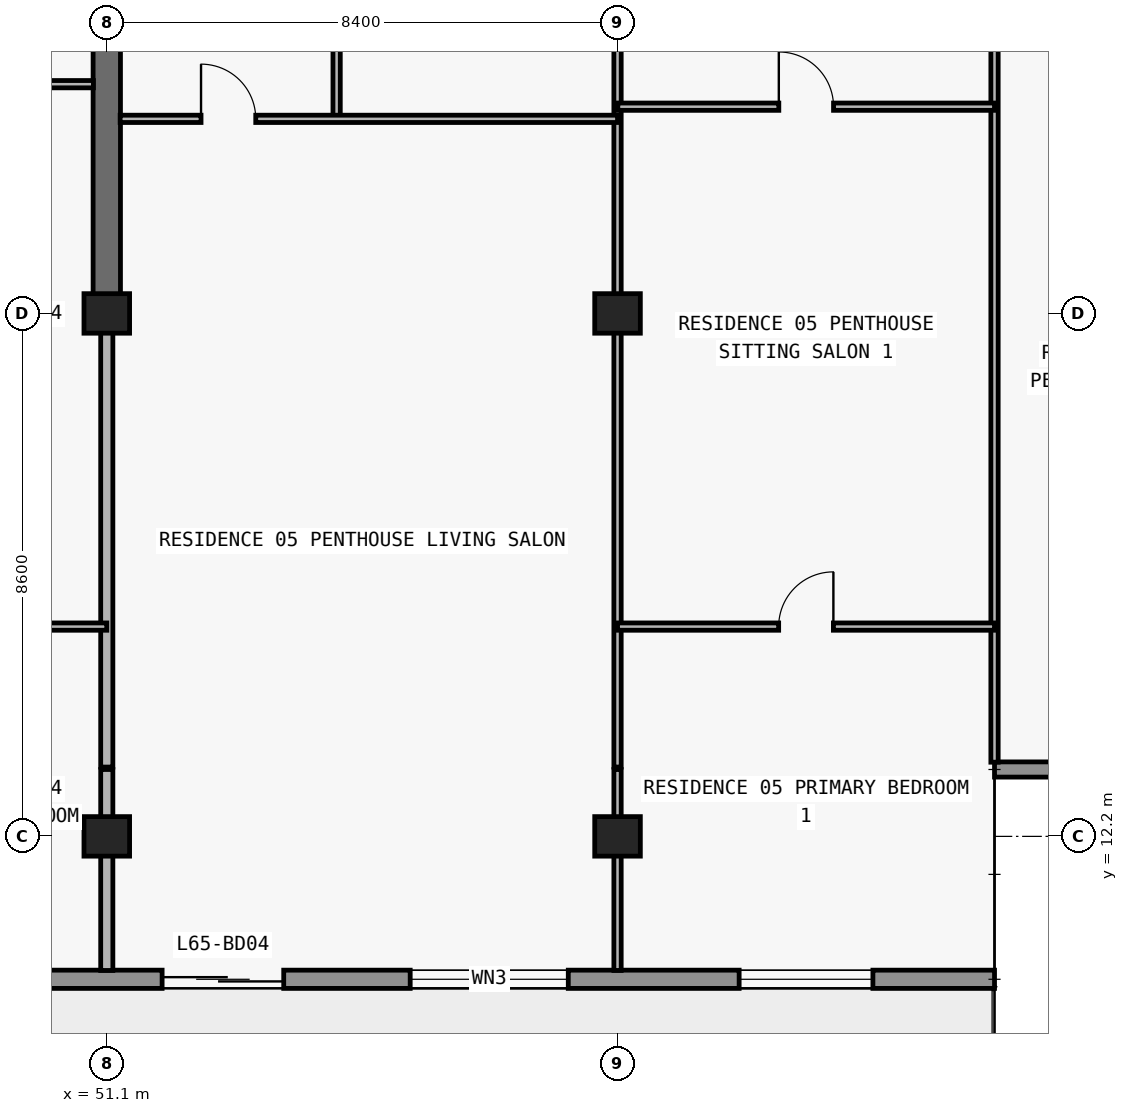
"""IFC4 building model, lengths in metres.
Left out: names, types, materials, properties, quantities, classifications, styles, units other than length and angle.
Written with IfcOpenShell. Run it as: python <this file> out.ifc"""

import sys

from ifc_helpers import new_model, si_unit, direction, frame, frame_2d, origin, origin_2d, place, context, subcontext, project, spatial, rectangle, extrude, element, fill, save


model = new_model("IFC4")
c1 = context("Model", 3, precision=1e-05, world=origin(), true_north=direction((0.0, 1.0)))
c2 = subcontext(c1, "Body", "Model", "MODEL_VIEW")
j1 = project(units=[si_unit("LENGTHUNIT", "METRE"), si_unit("PLANEANGLEUNIT", "RADIAN")], contexts=[c1])
p1 = place(None, origin())
s1 = spatial("IfcSite", under=j1, at=p1, CompositionType="ELEMENT")
p2 = place(p1, origin())
s2 = spatial("IfcBuilding", under=s1, at=p2, CompositionType="ELEMENT")
p3 = place(p2, frame((0.0, 0.0, 233.1)))
s3 = spatial("IfcBuildingStorey", under=s2, at=p3, CompositionType="ELEMENT", Elevation=233.1)
for number, where, z_axis, x_axis in (
    (1, (51.1, 12.2, 0.0), (0.0, 0.0, 1.0), (1.0, 0.0, 0.0)),
    (2, (59.5, 12.2, 0.0), (0.0, 0.0, 1.0), (1.0, 0.0, 0.0)),
    (3, (51.1, 20.8, 0.0), (0.0, 0.0, 1.0), (1.0, 0.0, 0.0)),
    (4, (59.5, 20.8, 0.0), (0.0, 0.0, 1.0), (1.0, 0.0, 0.0)),
):
    element("IfcColumn", number, at=place(p3, frame(where, z_axis=z_axis, x_axis=x_axis)), inside=s3, PredefinedType="COLUMN", context=c2, shape_type="SweptSolid", body=[
        extrude(rectangle(XDim=0.75, YDim=0.65, at=origin_2d()), origin(), (0.0, 0.0, 1.0), 3.05),
    ])
p4 = place(p3, frame((51.1, 20.8, 0.0), z_axis=(0.0, 0.0, 1.0), x_axis=(0.0, 1.0, 0.0)))
e5 = element("IfcWall", 5, at=p4, inside=s3, PredefinedType="SHEAR", context=c2, shape_type="SweptSolid", body=[
    extrude(rectangle(XDim=8.6, YDim=0.45, at=frame_2d((4.3, 0.0))), origin(), (0.0, 0.0, 1.0), 3.05),
])
p5 = place(p3, frame((65.7, 9.85, 0.0), z_axis=(0.0, 0.0, 1.0), x_axis=(-1.0, 0.0, 0.0)))
e6 = element("IfcWall", 6, at=p5, inside=s3, PredefinedType="STANDARD", context=c2, shape_type="SweptSolid", body=[
    extrude(rectangle(XDim=53.6, YDim=0.3, at=frame_2d((26.8, 0.0))), origin(), (0.0, 0.0, 1.0), 3.05),
])
p6 = place(p5, frame((49.5, 0.0, 0.0)))
e7 = element("IfcOpeningElement", 7, at=p6, cuts=e6, PredefinedType="OPENING", context=c2, shape_type="SweptSolid", body=[
    extrude(rectangle(XDim=2.0, YDim=2.3, at=frame_2d((1.0, 1.15))), frame((0.0, 0.16, 0.0), z_axis=(0.0, -1.0, 0.0), x_axis=(1.0, 0.0, 0.0)), (0.0, 0.0, 1.0), 0.32),
])
p7 = place(p5, frame((42.1, 0.0, 0.85)))
e8 = element("IfcOpeningElement", 8, at=p7, cuts=e6, PredefinedType="OPENING", context=c2, shape_type="SweptSolid", body=[
    extrude(rectangle(XDim=2.2, YDim=1.55, at=frame_2d((1.1, 0.775))), frame((0.0, 0.16, 0.0), z_axis=(0.0, -1.0, 0.0), x_axis=(1.0, 0.0, 0.0)), (0.0, 0.0, 1.0), 0.32),
])
p8 = place(p5, frame((35.69, 0.0, 0.0)))
e9 = element("IfcOpeningElement", 9, at=p8, cuts=e6, PredefinedType="OPENING", context=c2, shape_type="SweptSolid", body=[
    extrude(rectangle(XDim=2.0, YDim=2.3, at=frame_2d((1.0, 1.15))), frame((0.0, 0.16, 0.0), z_axis=(0.0, -1.0, 0.0), x_axis=(1.0, 0.0, 0.0)), (0.0, 0.0, 1.0), 0.32),
])
p9 = place(p5, frame((31.59, 0.0, 0.85)))
e10 = element("IfcOpeningElement", 10, at=p9, cuts=e6, PredefinedType="OPENING", context=c2, shape_type="SweptSolid", body=[
    extrude(rectangle(XDim=1.8, YDim=1.55, at=frame_2d((0.9, 0.775))), frame((0.0, 0.16, 0.0), z_axis=(0.0, -1.0, 0.0), x_axis=(1.0, 0.0, 0.0)), (0.0, 0.0, 1.0), 0.32),
])
p10 = place(p5, frame((23.914, 0.0, 0.85)))
e11 = element("IfcOpeningElement", 11, at=p10, cuts=e6, PredefinedType="OPENING", context=c2, shape_type="SweptSolid", body=[
    extrude(rectangle(XDim=2.2, YDim=1.55, at=frame_2d((1.1, 0.775))), frame((0.0, 0.16, 0.0), z_axis=(0.0, -1.0, 0.0), x_axis=(1.0, 0.0, 0.0)), (0.0, 0.0, 1.0), 0.32),
])
p11 = place(p5, frame((19.69, 0.0, 0.0)))
e12 = element("IfcOpeningElement", 12, at=p11, cuts=e6, PredefinedType="OPENING", context=c2, shape_type="SweptSolid", body=[
    extrude(rectangle(XDim=2.0, YDim=2.3, at=frame_2d((1.0, 1.15))), frame((0.0, 0.16, 0.0), z_axis=(0.0, -1.0, 0.0), x_axis=(1.0, 0.0, 0.0)), (0.0, 0.0, 1.0), 0.32),
])
p12 = place(p5, frame((15.59, 0.0, 0.85)))
e13 = element("IfcOpeningElement", 13, at=p12, cuts=e6, PredefinedType="OPENING", context=c2, shape_type="SweptSolid", body=[
    extrude(rectangle(XDim=1.8, YDim=1.55, at=frame_2d((0.9, 0.775))), frame((0.0, 0.16, 0.0), z_axis=(0.0, -1.0, 0.0), x_axis=(1.0, 0.0, 0.0)), (0.0, 0.0, 1.0), 0.32),
])
p13 = place(p5, frame((11.69, 0.0, 0.0)))
e14 = element("IfcOpeningElement", 14, at=p13, cuts=e6, PredefinedType="OPENING", context=c2, shape_type="SweptSolid", body=[
    extrude(rectangle(XDim=2.0, YDim=2.3, at=frame_2d((1.0, 1.15))), frame((0.0, 0.16, 0.0), z_axis=(0.0, -1.0, 0.0), x_axis=(1.0, 0.0, 0.0)), (0.0, 0.0, 1.0), 0.32),
])
p14 = place(p5, frame((7.01, 0.0, 0.65)))
e15 = element("IfcOpeningElement", 15, at=p14, cuts=e6, PredefinedType="OPENING", context=c2, shape_type="SweptSolid", body=[
    extrude(rectangle(XDim=2.6, YDim=1.85, at=frame_2d((1.3, 0.925))), frame((0.0, 0.16, 0.0), z_axis=(0.0, -1.0, 0.0), x_axis=(1.0, 0.0, 0.0)), (0.0, 0.0, 1.0), 0.32),
])
p15 = place(p5, frame((2.0, 0.0, 0.85)))
e16 = element("IfcOpeningElement", 16, at=p15, cuts=e6, PredefinedType="OPENING", context=c2, shape_type="SweptSolid", body=[
    extrude(rectangle(XDim=2.2, YDim=1.55, at=frame_2d((1.1, 0.775))), frame((0.0, 0.16, 0.0), z_axis=(0.0, -1.0, 0.0), x_axis=(1.0, 0.0, 0.0)), (0.0, 0.0, 1.0), 0.32),
])
p16 = place(p3, frame((65.7, 13.3, 0.0), z_axis=(0.0, 0.0, 1.0), x_axis=(1.0, 0.0, 0.0)))
e17 = element("IfcWall", 17, at=p16, inside=s3, PredefinedType="ELEMENTEDWALL", context=c2, shape_type="SweptSolid", body=[
    extrude(rectangle(XDim=3.85, YDim=0.25, at=frame_2d((1.925, 0.0))), origin(), (0.0, 0.0, 1.0), 3.05),
])
p17 = place(p3, frame((51.1, 9.995, 0.0), z_axis=(0.0, 0.0, 1.0), x_axis=(0.0, 1.0, 0.0)))
e18 = element("IfcWall", 18, at=p17, inside=s3, PredefinedType="PARTITIONING", context=c2, shape_type="SweptSolid", body=[
    extrude(rectangle(XDim=3.305, YDim=0.2, at=frame_2d((1.652, 0.0))), origin(), (0.0, 0.0, 1.0), 2.263),
])
p18 = place(p3, frame((51.1, 13.34, 0.0), z_axis=(0.0, 0.0, 1.0), x_axis=(0.0, 1.0, 0.0)))
e19 = element("IfcWall", 19, at=p18, inside=s3, PredefinedType="PARTITIONING", context=c2, shape_type="SweptSolid", body=[
    extrude(rectangle(XDim=7.455, YDim=0.2, at=frame_2d((3.728, 0.0))), origin(), (0.0, 0.0, 1.0), 2.263),
])
p19 = place(p3, frame((54.88, 24.0, 0.0), z_axis=(0.0, 0.0, 1.0), x_axis=(0.0, 1.0, 0.0)))
e20 = element("IfcWall", 20, at=p19, inside=s3, PredefinedType="PARTITIONING", context=c2, shape_type="SweptSolid", body=[
    extrude(rectangle(XDim=4.8, YDim=0.12, at=frame_2d((2.4, 0.0))), origin(), (0.0, 0.0, 1.0), 3.05),
])
p20 = place(p19, frame((1.95, 0.0, 0.0)))
e21 = element("IfcOpeningElement", 21, at=p20, cuts=e20, PredefinedType="OPENING", context=c2, shape_type="SweptSolid", body=[
    extrude(rectangle(XDim=0.9, YDim=2.15, at=frame_2d((0.45, 1.075))), frame((0.0, 0.07, 0.0), z_axis=(0.0, -1.0, 0.0), x_axis=(1.0, 0.0, 0.0)), (0.0, 0.0, 1.0), 0.14),
])
p21 = place(p3, frame((59.5, 9.995, 0.0), z_axis=(0.0, 0.0, 1.0), x_axis=(0.0, 1.0, 0.0)))
e22 = element("IfcWall", 22, at=p21, inside=s3, PredefinedType="PARTITIONING", context=c2, shape_type="SweptSolid", body=[
    extrude(rectangle(XDim=3.305, YDim=0.12, at=frame_2d((1.652, 0.0))), origin(), (0.0, 0.0, 1.0), 2.263),
])
p22 = place(p3, frame((59.5, 13.34, 0.0), z_axis=(0.0, 0.0, 1.0), x_axis=(0.0, 1.0, 0.0)))
e23 = element("IfcWall", 23, at=p22, inside=s3, PredefinedType="PARTITIONING", context=c2, shape_type="SweptSolid", body=[
    extrude(rectangle(XDim=16.06, YDim=0.12, at=frame_2d((8.03, 0.0))), origin(), (0.0, 0.0, 1.0), 2.263),
])
p23 = place(p22, frame((12.61, 0.0, 0.0)))
e24 = element("IfcOpeningElement", 24, at=p23, cuts=e23, PredefinedType="OPENING", context=c2, shape_type="SweptSolid", body=[
    extrude(rectangle(XDim=0.9, YDim=2.15, at=frame_2d((0.45, 1.075))), frame((0.0, 0.07, 0.0), z_axis=(0.0, -1.0, 0.0), x_axis=(1.0, 0.0, 0.0)), (0.0, 0.0, 1.0), 0.14),
])
p24 = place(p3, frame((65.7, 13.42, 0.0), z_axis=(0.0, 0.0, 1.0), x_axis=(0.0, 1.0, 0.0)))
e25 = element("IfcWall", 25, at=p24, inside=s3, PredefinedType="PARTITIONING", context=c2, shape_type="SweptSolid", body=[
    extrude(rectangle(XDim=15.98, YDim=0.12, at=frame_2d((7.99, 0.0))), origin(), (0.0, 0.0, 1.0), 2.629),
])
p25 = place(p24, frame((12.53, 0.0, 0.0)))
e26 = element("IfcOpeningElement", 26, at=p25, cuts=e25, PredefinedType="OPENING", context=c2, shape_type="SweptSolid", body=[
    extrude(rectangle(XDim=0.9, YDim=2.15, at=frame_2d((0.45, 1.075))), frame((0.0, 0.07, 0.0), z_axis=(0.0, -1.0, 0.0), x_axis=(1.0, 0.0, 0.0)), (0.0, 0.0, 1.0), 0.14),
])
p26 = place(p3, frame((47.32, 15.65, 0.0), z_axis=(0.0, 0.0, 1.0), x_axis=(1.0, 0.0, 0.0)))
e27 = element("IfcWall", 27, at=p26, inside=s3, PredefinedType="PARTITIONING", context=c2, shape_type="SweptSolid", body=[
    extrude(rectangle(XDim=3.78, YDim=0.12, at=frame_2d((1.89, 0.0))), origin(), (0.0, 0.0, 1.0), 3.05),
])
p27 = place(p26, frame((1.44, 0.0, 0.0)))
e28 = element("IfcOpeningElement", 28, at=p27, cuts=e27, PredefinedType="OPENING", context=c2, shape_type="SweptSolid", body=[
    extrude(rectangle(XDim=0.9, YDim=2.15, at=frame_2d((0.45, 1.075))), frame((0.0, 0.07, 0.0), z_axis=(0.0, -1.0, 0.0), x_axis=(1.0, 0.0, 0.0)), (0.0, 0.0, 1.0), 0.14),
])
p28 = place(p3, frame((59.5, 15.65, 0.0), z_axis=(0.0, 0.0, 1.0), x_axis=(1.0, 0.0, 0.0)))
e29 = element("IfcWall", 29, at=p28, inside=s3, PredefinedType="PARTITIONING", context=c2, shape_type="SweptSolid", body=[
    extrude(rectangle(XDim=6.2, YDim=0.12, at=frame_2d((3.1, 0.0))), origin(), (0.0, 0.0, 1.0), 3.05),
])
p29 = place(p28, frame((2.65, 0.0, 0.0)))
e30 = element("IfcOpeningElement", 30, at=p29, cuts=e29, PredefinedType="OPENING", context=c2, shape_type="SweptSolid", body=[
    extrude(rectangle(XDim=0.9, YDim=2.15, at=frame_2d((0.45, 1.075))), frame((0.0, 0.07, 0.0), z_axis=(0.0, -1.0, 0.0), x_axis=(1.0, 0.0, 0.0)), (0.0, 0.0, 1.0), 0.14),
])
p30 = place(p3, frame((51.32, 24.0, 0.0), z_axis=(0.0, 0.0, 1.0), x_axis=(1.0, 0.0, 0.0)))
e31 = element("IfcWall", 31, at=p30, inside=s3, PredefinedType="PARTITIONING", context=c2, shape_type="SweptSolid", body=[
    extrude(rectangle(XDim=8.18, YDim=0.12, at=frame_2d((4.09, 0.0))), origin(), (0.0, 0.0, 1.0), 3.05),
])
p31 = place(p30, frame((1.33, 0.0, 0.0)))
e32 = element("IfcOpeningElement", 32, at=p31, cuts=e31, PredefinedType="OPENING", context=c2, shape_type="SweptSolid", body=[
    extrude(rectangle(XDim=0.9, YDim=2.15, at=frame_2d((0.45, 1.075))), frame((0.0, 0.07, 0.0), z_axis=(0.0, -1.0, 0.0), x_axis=(1.0, 0.0, 0.0)), (0.0, 0.0, 1.0), 0.14),
])
p32 = place(p3, frame((59.505, 24.2, 0.0), z_axis=(0.0, 0.0, 1.0), x_axis=(1.0, 0.0, 0.0)))
e33 = element("IfcWall", 33, at=p32, inside=s3, PredefinedType="PARTITIONING", context=c2, shape_type="SweptSolid", body=[
    extrude(rectangle(XDim=6.195, YDim=0.12, at=frame_2d((3.098, 0.0))), origin(), (0.0, 0.0, 1.0), 3.05),
])
p33 = place(p32, frame((2.647, 0.0, 0.0)))
e34 = element("IfcOpeningElement", 34, at=p33, cuts=e33, PredefinedType="OPENING", context=c2, shape_type="SweptSolid", body=[
    extrude(rectangle(XDim=0.9, YDim=2.15, at=frame_2d((0.45, 1.075))), frame((0.0, 0.07, 0.0), z_axis=(0.0, -1.0, 0.0), x_axis=(1.0, 0.0, 0.0)), (0.0, 0.0, 1.0), 0.14),
])
p34 = place(p3, frame((42.7, 24.57, 0.0), z_axis=(0.0, 0.0, 1.0), x_axis=(1.0, 0.0, 0.0)))
e35 = element("IfcWall", 35, at=p34, inside=s3, PredefinedType="PARTITIONING", context=c2, shape_type="SweptSolid", body=[
    extrude(rectangle(XDim=8.18, YDim=0.12, at=frame_2d((4.09, 0.0))), origin(), (0.0, 0.0, 1.0), 3.05),
])
p35 = place(p34, frame((1.86, 0.0, 0.0)))
e36 = element("IfcOpeningElement", 36, at=p35, cuts=e35, PredefinedType="OPENING", context=c2, shape_type="SweptSolid", body=[
    extrude(rectangle(XDim=0.9, YDim=2.15, at=frame_2d((0.45, 1.075))), frame((0.0, 0.07, 0.0), z_axis=(0.0, -1.0, 0.0), x_axis=(1.0, 0.0, 0.0)), (0.0, 0.0, 1.0), 0.14),
])
p36 = place(p34, frame((6.033, 0.0, 0.0)))
e37 = element("IfcOpeningElement", 37, at=p36, cuts=e35, PredefinedType="OPENING", context=c2, shape_type="SweptSolid", body=[
    extrude(rectangle(XDim=0.9, YDim=2.15, at=frame_2d((0.45, 1.075))), frame((0.0, 0.07, 0.0), z_axis=(0.0, -1.0, 0.0), x_axis=(1.0, 0.0, 0.0)), (0.0, 0.0, 1.0), 0.14),
])
p37 = place(p13, origin())
e38 = element("IfcDoor", 38, at=p37, inside=s3, OperationType="DOUBLE_DOOR_SLIDING", PredefinedType="DOOR", context=c2, shape_type="SweptSolid", body=[
    extrude(rectangle(XDim=2.0, YDim=2.3, at=frame_2d((1.0, 1.15))), frame((0.0, 0.025, 0.0), z_axis=(0.0, -1.0, 0.0), x_axis=(1.0, 0.0, 0.0)), (0.0, 0.0, 1.0), 0.05),
])
fill(e14, e38)
p38 = place(p14, origin())
e39 = element("IfcWindow", 39, at=p38, inside=s3, PartitioningType="SINGLE_PANEL", PredefinedType="WINDOW", context=c2, shape_type="SweptSolid", body=[
    extrude(rectangle(XDim=2.6, YDim=1.85, at=frame_2d((1.3, 0.925))), frame((0.0, 0.03, 0.0), z_axis=(0.0, -1.0, 0.0), x_axis=(1.0, 0.0, 0.0)), (0.0, 0.0, 1.0), 0.06),
])
fill(e15, e39)
p39 = place(p15, origin())
e40 = element("IfcWindow", 40, at=p39, inside=s3, PartitioningType="SINGLE_PANEL", PredefinedType="WINDOW", context=c2, shape_type="SweptSolid", body=[
    extrude(rectangle(XDim=2.2, YDim=1.55, at=frame_2d((1.1, 0.775))), frame((0.0, 0.03, 0.0), z_axis=(0.0, -1.0, 0.0), x_axis=(1.0, 0.0, 0.0)), (0.0, 0.0, 1.0), 0.06),
])
fill(e16, e40)
p40 = place(p31, origin())
e41 = element("IfcDoor", 41, at=p40, inside=s3, OperationType="SINGLE_SWING_LEFT", PredefinedType="DOOR", context=c2, shape_type="SweptSolid", body=[
    extrude(rectangle(XDim=0.9, YDim=2.15, at=frame_2d((0.45, 1.075))), frame((0.0, 0.025, 0.0), z_axis=(0.0, -1.0, 0.0), x_axis=(1.0, 0.0, 0.0)), (0.0, 0.0, 1.0), 0.05),
])
fill(e32, e41)
p41 = place(p33, origin())
e42 = element("IfcDoor", 42, at=p41, inside=s3, OperationType="SINGLE_SWING_LEFT", PredefinedType="DOOR", context=c2, shape_type="SweptSolid", body=[
    extrude(rectangle(XDim=0.9, YDim=2.15, at=frame_2d((0.45, 1.075))), frame((0.0, 0.025, 0.0), z_axis=(0.0, -1.0, 0.0), x_axis=(1.0, 0.0, 0.0)), (0.0, 0.0, 1.0), 0.05),
])
fill(e34, e42)
p42 = place(p29, origin())
e43 = element("IfcDoor", 43, at=p42, inside=s3, OperationType="SINGLE_SWING_RIGHT", PredefinedType="DOOR", context=c2, shape_type="SweptSolid", body=[
    extrude(rectangle(XDim=0.9, YDim=2.15, at=frame_2d((0.45, 1.075))), frame((0.0, 0.025, 0.0), z_axis=(0.0, -1.0, 0.0), x_axis=(1.0, 0.0, 0.0)), (0.0, 0.0, 1.0), 0.05),
])
fill(e30, e43)
save(model, sys.argv[1])
